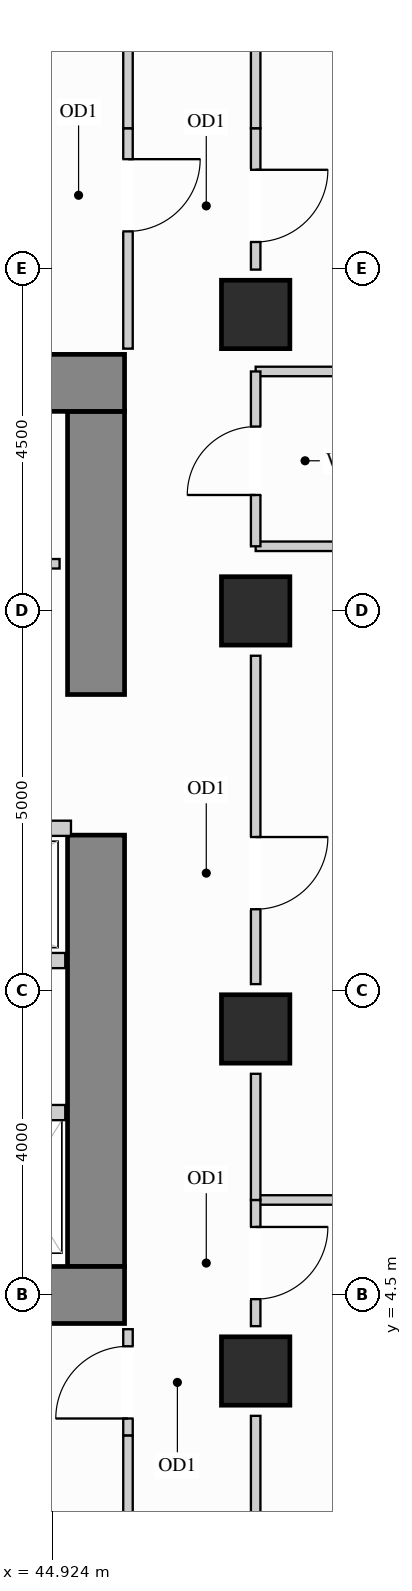
"""IFC4 building model, lengths in metres.
Left out: names, types, materials, properties, quantities, classifications, styles, units other than length and angle.
Written with IfcOpenShell. Run it as: python <this file> out.ifc"""

import sys

from ifc_helpers import new_model, si_unit, direction, frame, frame_2d, origin, origin_2d, place, context, subcontext, project, spatial, rectangle, extrude, source, transform, mapped, element, fill, save


model = new_model("IFC4")
c1 = context("Model", 3, precision=1e-05, world=origin(), true_north=direction((0.0, 1.0)))
c2 = subcontext(c1, "Body", "Model", "MODEL_VIEW")
j1 = project(units=[si_unit("LENGTHUNIT", "METRE"), si_unit("PLANEANGLEUNIT", "RADIAN")], contexts=[c1])
p1 = place(None, origin())
s1 = spatial("IfcSite", under=j1, at=p1, CompositionType="ELEMENT")
p2 = place(p1, origin())
s2 = spatial("IfcBuilding", under=s1, at=p2, CompositionType="ELEMENT")
p3 = place(p2, frame((0.0, 0.0, 109.8)))
s3 = spatial("IfcBuildingStorey", under=s2, at=p3, CompositionType="ELEMENT", Elevation=109.8)
m1 = source(origin(), c2, "Body", "SweptSolid", [
    extrude(rectangle(XDim=0.9, YDim=0.9, at=origin_2d()), origin(), (0.0, 0.0, 1.0), 3.38),
])
for number, where, z_axis, x_axis in (
    (1, (47.6, 13.5, 0.0), (0.0, 0.0, 1.0), (1.0, 0.0, 0.0)),
    (2, (47.6, 3.5, 0.0), (0.0, 0.0, 1.0), (1.0, 0.0, 0.0)),
    (3, (47.6, 8.0, 0.0), (0.0, 0.0, 1.0), (1.0, 0.0, 0.0)),
    (4, (47.6, 17.4, 0.0), (0.0, 0.0, 1.0), (1.0, 0.0, 0.0)),
):
    element("IfcColumn", number, at=place(p3, frame(where, z_axis=z_axis, x_axis=x_axis)), inside=s3, PredefinedType="COLUMN", context=c2, shape_type="MappedRepresentation", body=[
        mapped(m1, transform((0.0, 0.0, 0.0), x_axis=(1.0, 0.0, 0.0), y_axis=(0.0, 1.0, 0.0), z_axis=(0.0, 0.0, 1.0))),
    ])
m2 = source(origin(), c2, "Body", "SweptSolid", [
    extrude(rectangle(XDim=5.675, YDim=0.75, at=frame_2d((2.837, 0.0))), origin(), (0.0, 0.0, 1.0), 3.38),
])
p4 = place(p3, frame((45.5, 4.875, 0.0), z_axis=(0.0, 0.0, 1.0), x_axis=(0.0, 1.0, 0.0)))
e5 = element("IfcWall", 5, at=p4, inside=s3, PredefinedType="SHEAR", context=c2, shape_type="MappedRepresentation", body=[
    mapped(m2, transform((0.0, 0.0, 0.0), x_axis=(1.0, 0.0, 0.0), y_axis=(0.0, 1.0, 0.0), z_axis=(0.0, 0.0, 1.0))),
])
m3 = source(origin(), c2, "Body", "SweptSolid", [
    extrude(rectangle(XDim=3.725, YDim=0.75, at=frame_2d((1.863, 0.0))), origin(), (0.0, 0.0, 1.0), 3.38),
])
p5 = place(p3, frame((45.5, 12.4, 0.0), z_axis=(0.0, 0.0, 1.0), x_axis=(0.0, 1.0, 0.0)))
e6 = element("IfcWall", 6, at=p5, inside=s3, PredefinedType="SHEAR", context=c2, shape_type="MappedRepresentation", body=[
    mapped(m3, transform((0.0, 0.0, 0.0), x_axis=(1.0, 0.0, 0.0), y_axis=(0.0, 1.0, 0.0), z_axis=(0.0, 0.0, 1.0))),
])
m4 = source(origin(), c2, "Body", "SweptSolid", [
    extrude(rectangle(XDim=10.25, YDim=0.75, at=frame_2d((5.125, 0.0))), origin(), (0.0, 0.0, 1.0), 3.38),
])
for number, where, z_axis, x_axis in (
    (7, (35.625, 16.5, 0.0), (0.0, 0.0, 1.0), (1.0, 0.0, 0.0)),
    (8, (35.625, 4.5, 0.0), (0.0, 0.0, 1.0), (1.0, 0.0, 0.0)),
):
    element("IfcWall", number, at=place(p3, frame(where, z_axis=z_axis, x_axis=x_axis)), inside=s3, PredefinedType="SHEAR", context=c2, shape_type="MappedRepresentation", body=[
        mapped(m4, transform((0.0, 0.0, 0.0), x_axis=(1.0, 0.0, 0.0), y_axis=(0.0, 1.0, 0.0), z_axis=(0.0, 0.0, 1.0))),
    ])
p6 = place(p3, frame((41.8, 14.12, 0.0), z_axis=(0.0, 0.0, 1.0), x_axis=(1.0, 0.0, 0.0)))
e9 = element("IfcWall", 9, at=p6, inside=s3, PredefinedType="PARTITIONING", context=c2, shape_type="SweptSolid", body=[
    extrude(rectangle(XDim=3.22, YDim=0.125, at=frame_2d((1.61, 0.0))), origin(), (0.0, 0.0, 1.0), 3.365),
])
p7 = place(p6, frame((1.135, 0.0, 0.0)))
e10 = element("IfcOpeningElement", 10, at=p7, cuts=e9, PredefinedType="OPENING", context=c2, shape_type="SweptSolid", body=[
    extrude(rectangle(XDim=0.85, YDim=2.1, at=frame_2d((0.425, 1.05))), frame((0.0, 0.073, 0.0), z_axis=(0.0, -1.0, 0.0), x_axis=(1.0, 0.0, 0.0)), (0.0, 0.0, 1.0), 0.145),
])
m5 = source(origin(), c2, "Body", "SweptSolid", [
    extrude(rectangle(XDim=8.048, YDim=0.125, at=frame_2d((4.024, 0.0))), origin(), (0.0, 0.0, 1.0), 3.365),
])
p8 = place(p3, frame((47.6, 14.35, 0.0), z_axis=(0.0, 0.0, 1.0), x_axis=(1.0, 0.0, 0.0)))
e11 = element("IfcWall", 11, at=p8, inside=s3, PredefinedType="PARTITIONING", context=c2, shape_type="MappedRepresentation", body=[
    mapped(m5, transform((0.0, 0.0, 0.0), x_axis=(1.0, 0.0, 0.0), y_axis=(0.0, 1.0, 0.0), z_axis=(0.0, 0.0, 1.0))),
])
m6 = source(origin(), c2, "Body", "SweptSolid", [
    extrude(rectangle(XDim=8.048, YDim=0.125, at=frame_2d((4.024, 0.0))), origin(), (0.0, 0.0, 1.0), 2.677),
])
p9 = place(p3, frame((47.6, 16.65, 0.0), z_axis=(0.0, 0.0, 1.0), x_axis=(1.0, 0.0, 0.0)))
e12 = element("IfcWall", 12, at=p9, inside=s3, PredefinedType="PARTITIONING", context=c2, shape_type="MappedRepresentation", body=[
    mapped(m6, transform((0.0, 0.0, 0.0), x_axis=(1.0, 0.0, 0.0), y_axis=(0.0, 1.0, 0.0), z_axis=(0.0, 0.0, 1.0))),
])
p10 = place(p3, frame((47.6, 5.75, 0.0), z_axis=(0.0, 0.0, 1.0), x_axis=(1.0, 0.0, 0.0)))
e13 = element("IfcWall", 13, at=p10, inside=s3, PredefinedType="PARTITIONING", context=c2, shape_type="MappedRepresentation", body=[
    mapped(m5, transform((0.0, 0.0, 0.0), x_axis=(1.0, 0.0, 0.0), y_axis=(0.0, 1.0, 0.0), z_axis=(0.0, 0.0, 1.0))),
])
p11 = place(p3, frame((47.6, 4.09, 0.0), z_axis=(0.0, 0.0, 1.0), x_axis=(0.0, 1.0, 0.0)))
e14 = element("IfcWall", 14, at=p11, inside=s3, PredefinedType="PARTITIONING", context=c2, shape_type="SweptSolid", body=[
    extrude(rectangle(XDim=1.66, YDim=0.125, at=frame_2d((0.83, 0.0))), origin(), (0.0, 0.0, 1.0), 2.677),
])
p12 = place(p11, frame((0.355, 0.0, 0.0)))
e15 = element("IfcOpeningElement", 15, at=p12, cuts=e14, PredefinedType="OPENING", context=c2, shape_type="SweptSolid", body=[
    extrude(rectangle(XDim=0.95, YDim=2.15, at=frame_2d((0.475, 1.075))), frame((0.0, 0.073, 0.0), z_axis=(0.0, -1.0, 0.0), x_axis=(1.0, 0.0, 0.0)), (0.0, 0.0, 1.0), 0.145),
])
m7 = source(origin(), c2, "Body", "SweptSolid", [
    extrude(rectangle(XDim=1.72, YDim=0.125, at=frame_2d((0.86, 0.0))), origin(), (0.0, 0.0, 1.0), 2.677),
])
p13 = place(p3, frame((47.6, 1.19, 0.0), z_axis=(0.0, 0.0, 1.0), x_axis=(0.0, 1.0, 0.0)))
e16 = element("IfcWall", 16, at=p13, inside=s3, PredefinedType="PARTITIONING", context=c2, shape_type="MappedRepresentation", body=[
    mapped(m7, transform((0.0, 0.0, 0.0), x_axis=(1.0, 0.0, 0.0), y_axis=(0.0, 1.0, 0.0), z_axis=(0.0, 0.0, 1.0))),
])
m8 = source(origin(), c2, "Body", "SweptSolid", [
    extrude(rectangle(XDim=1.66, YDim=0.125, at=frame_2d((0.83, 0.0))), origin(), (0.0, 0.0, 1.0), 2.677),
])
p14 = place(p3, frame((47.6, 5.75, 0.0), z_axis=(0.0, 0.0, 1.0), x_axis=(0.0, 1.0, 0.0)))
e17 = element("IfcWall", 17, at=p14, inside=s3, PredefinedType="PARTITIONING", context=c2, shape_type="MappedRepresentation", body=[
    mapped(m8, transform((0.0, 0.0, 0.0), x_axis=(1.0, 0.0, 0.0), y_axis=(0.0, 1.0, 0.0), z_axis=(0.0, 0.0, 1.0))),
])
p15 = place(p3, frame((47.6, 8.59, 0.0), z_axis=(0.0, 0.0, 1.0), x_axis=(0.0, 1.0, 0.0)))
e18 = element("IfcWall", 18, at=p15, inside=s3, PredefinedType="PARTITIONING", context=c2, shape_type="SweptSolid", body=[
    extrude(rectangle(XDim=4.32, YDim=0.125, at=frame_2d((2.16, 0.0))), origin(), (0.0, 0.0, 1.0), 2.677),
])
p16 = place(p15, frame((0.985, 0.0, 0.0)))
e19 = element("IfcOpeningElement", 19, at=p16, cuts=e18, PredefinedType="OPENING", context=c2, shape_type="SweptSolid", body=[
    extrude(rectangle(XDim=0.95, YDim=2.15, at=frame_2d((0.475, 1.075))), frame((0.0, 0.073, 0.0), z_axis=(0.0, -1.0, 0.0), x_axis=(1.0, 0.0, 0.0)), (0.0, 0.0, 1.0), 0.145),
])
p17 = place(p3, frame((47.6, 17.99, 0.0), z_axis=(0.0, 0.0, 1.0), x_axis=(0.0, 1.0, 0.0)))
e20 = element("IfcWall", 20, at=p17, inside=s3, PredefinedType="PARTITIONING", context=c2, shape_type="SweptSolid", body=[
    extrude(rectangle(XDim=1.86, YDim=0.125, at=frame_2d((0.93, 0.0))), origin(), (0.0, 0.0, 1.0), 2.677),
])
p18 = place(p17, frame((0.363, 0.0, 0.0)))
e21 = element("IfcOpeningElement", 21, at=p18, cuts=e20, PredefinedType="OPENING", context=c2, shape_type="SweptSolid", body=[
    extrude(rectangle(XDim=0.95, YDim=2.15, at=frame_2d((0.475, 1.075))), frame((0.0, 0.073, 0.0), z_axis=(0.0, -1.0, 0.0), x_axis=(1.0, 0.0, 0.0)), (0.0, 0.0, 1.0), 0.145),
])
m9 = source(origin(), c2, "Body", "SweptSolid", [
    extrude(rectangle(XDim=1.46, YDim=0.125, at=frame_2d((0.73, 0.0))), origin(), (0.0, 0.0, 1.0), 2.677),
])
p19 = place(p3, frame((47.6, 19.85, 0.0), z_axis=(0.0, 0.0, 1.0), x_axis=(0.0, 1.0, 0.0)))
e22 = element("IfcWall", 22, at=p19, inside=s3, PredefinedType="PARTITIONING", context=c2, shape_type="MappedRepresentation", body=[
    mapped(m9, transform((0.0, 0.0, 0.0), x_axis=(1.0, 0.0, 0.0), y_axis=(0.0, 1.0, 0.0), z_axis=(0.0, 0.0, 1.0))),
])
p20 = place(p3, frame((47.6, 14.35, 0.0), z_axis=(0.0, 0.0, 1.0), x_axis=(0.0, 1.0, 0.0)))
e23 = element("IfcWall", 23, at=p20, inside=s3, PredefinedType="PARTITIONING", context=c2, shape_type="SweptSolid", body=[
    extrude(rectangle(XDim=2.3, YDim=0.125, at=frame_2d((1.15, 0.0))), origin(), (0.0, 0.0, 1.0), 2.677),
])
p21 = place(p20, frame((0.675, 0.0, 0.0)))
e24 = element("IfcOpeningElement", 24, at=p21, cuts=e23, PredefinedType="OPENING", context=c2, shape_type="SweptSolid", body=[
    extrude(rectangle(XDim=0.9, YDim=2.15, at=frame_2d((0.45, 1.075))), frame((0.0, 0.073, 0.0), z_axis=(0.0, -1.0, 0.0), x_axis=(1.0, 0.0, 0.0)), (0.0, 0.0, 1.0), 0.145),
])
p22 = place(p3, frame((45.92, 16.95, 0.0), z_axis=(0.0, 0.0, 1.0), x_axis=(0.0, 1.0, 0.0)))
e25 = element("IfcWall", 25, at=p22, inside=s3, PredefinedType="PARTITIONING", context=c2, shape_type="SweptSolid", body=[
    extrude(rectangle(XDim=2.9, YDim=0.125, at=frame_2d((1.45, 0.0))), origin(), (0.0, 0.0, 1.0), 3.365),
])
p23 = place(p22, frame((1.543, 0.0, 0.0)))
e26 = element("IfcOpeningElement", 26, at=p23, cuts=e25, PredefinedType="OPENING", context=c2, shape_type="SweptSolid", body=[
    extrude(rectangle(XDim=0.95, YDim=2.15, at=frame_2d((0.475, 1.075))), frame((0.0, 0.073, 0.0), z_axis=(0.0, -1.0, 0.0), x_axis=(1.0, 0.0, 0.0)), (0.0, 0.0, 1.0), 0.145),
])
m10 = source(origin(), c2, "Body", "SweptSolid", [
    extrude(rectangle(XDim=2.298, YDim=0.125, at=frame_2d((1.149, 0.0))), origin(), (0.0, 0.0, 1.0), 3.365),
])
p24 = place(p3, frame((45.92, 19.85, 0.0), z_axis=(0.0, 0.0, 1.0), x_axis=(0.0, 1.0, 0.0)))
e27 = element("IfcWall", 27, at=p24, inside=s3, PredefinedType="PARTITIONING", context=c2, shape_type="MappedRepresentation", body=[
    mapped(m10, transform((0.0, 0.0, 0.0), x_axis=(1.0, 0.0, 0.0), y_axis=(0.0, 1.0, 0.0), z_axis=(0.0, 0.0, 1.0))),
])
p25 = place(p3, frame((45.92, 2.65, 0.0), z_axis=(0.0, 0.0, 1.0), x_axis=(0.0, 1.0, 0.0)))
e28 = element("IfcWall", 28, at=p25, inside=s3, PredefinedType="PARTITIONING", context=c2, shape_type="SweptSolid", body=[
    extrude(rectangle(XDim=1.4, YDim=0.125, at=frame_2d((0.7, 0.0))), origin(), (0.0, 0.0, 1.0), 3.365),
])
p26 = place(p25, frame((0.225, 0.0, 0.0)))
e29 = element("IfcOpeningElement", 29, at=p26, cuts=e28, PredefinedType="OPENING", context=c2, shape_type="SweptSolid", body=[
    extrude(rectangle(XDim=0.95, YDim=2.15, at=frame_2d((0.475, 1.075))), frame((0.0, 0.073, 0.0), z_axis=(0.0, -1.0, 0.0), x_axis=(1.0, 0.0, 0.0)), (0.0, 0.0, 1.0), 0.145),
])
p27 = place(p3, frame((45.92, 0.352, 0.0), z_axis=(0.0, 0.0, 1.0), x_axis=(0.0, 1.0, 0.0)))
e30 = element("IfcWall", 30, at=p27, inside=s3, PredefinedType="PARTITIONING", context=c2, shape_type="MappedRepresentation", body=[
    mapped(m10, transform((0.0, 0.0, 0.0), x_axis=(1.0, 0.0, 0.0), y_axis=(0.0, 1.0, 0.0), z_axis=(0.0, 0.0, 1.0))),
])
m11 = source(origin(), c2, "Body", "SweptSolid", [
    extrude(rectangle(XDim=1.245, YDim=0.2, at=frame_2d((0.623, 0.0))), origin(), (0.0, 0.0, 1.0), 3.365),
])
p28 = place(p3, frame((43.85, 6.9, 0.0), z_axis=(0.0, 0.0, 1.0), x_axis=(1.0, 0.0, 0.0)))
e31 = element("IfcWall", 31, at=p28, inside=s3, PredefinedType="PARTITIONING", context=c2, shape_type="MappedRepresentation", body=[
    mapped(m11, transform((0.0, 0.0, 0.0), x_axis=(1.0, 0.0, 0.0), y_axis=(0.0, 1.0, 0.0), z_axis=(0.0, 0.0, 1.0))),
])
m12 = source(origin(), c2, "Body", "SweptSolid", [
    extrude(rectangle(XDim=3.49, YDim=0.2, at=frame_2d((1.745, 0.0))), origin(), (0.0, 0.0, 1.0), 3.365),
])
p29 = place(p3, frame((41.68, 10.64, 0.0), z_axis=(0.0, 0.0, 1.0), x_axis=(1.0, 0.0, 0.0)))
e32 = element("IfcWall", 32, at=p29, inside=s3, PredefinedType="PARTITIONING", context=c2, shape_type="MappedRepresentation", body=[
    mapped(m12, transform((0.0, 0.0, 0.0), x_axis=(1.0, 0.0, 0.0), y_axis=(0.0, 1.0, 0.0), z_axis=(0.0, 0.0, 1.0))),
])
m13 = source(origin(), c2, "Body", "SweptSolid", [
    extrude(rectangle(XDim=3.415, YDim=0.2, at=frame_2d((1.708, 0.0))), origin(), (0.0, 0.0, 1.0), 3.365),
])
p30 = place(p3, frame((41.68, 8.9, 0.0), z_axis=(0.0, 0.0, 1.0), x_axis=(1.0, 0.0, 0.0)))
e33 = element("IfcWall", 33, at=p30, inside=s3, PredefinedType="PARTITIONING", context=c2, shape_type="MappedRepresentation", body=[
    mapped(m13, transform((0.0, 0.0, 0.0), x_axis=(1.0, 0.0, 0.0), y_axis=(0.0, 1.0, 0.0), z_axis=(0.0, 0.0, 1.0))),
])
m14 = source(origin(), c2, "Body", "SweptSolid", [
    extrude(rectangle(XDim=0.95, YDim=2.15, at=frame_2d((0.475, 1.075))), frame((0.0, 0.025, 0.0), z_axis=(0.0, -1.0, 0.0), x_axis=(1.0, 0.0, 0.0)), (0.0, 0.0, 1.0), 0.05),
])
p31 = place(p23, origin())
e34 = element("IfcDoor", 34, at=p31, inside=s3, OperationType="SINGLE_SWING_RIGHT", PredefinedType="DOOR", context=c2, shape_type="MappedRepresentation", body=[
    mapped(m14, transform((0.0, 0.0, 0.0), x_axis=(1.0, 0.0, 0.0), y_axis=(0.0, 1.0, 0.0), z_axis=(0.0, 0.0, 1.0))),
])
fill(e26, e34)
p32 = place(p26, origin())
e35 = element("IfcDoor", 35, at=p32, inside=s3, OperationType="SINGLE_SWING_LEFT", PredefinedType="DOOR", context=c2, shape_type="MappedRepresentation", body=[
    mapped(m14, transform((0.0, 0.0, 0.0), x_axis=(1.0, 0.0, 0.0), y_axis=(0.0, 1.0, 0.0), z_axis=(0.0, 0.0, 1.0))),
])
fill(e29, e35)
p33 = place(p12, origin())
e36 = element("IfcDoor", 36, at=p33, inside=s3, OperationType="SINGLE_SWING_RIGHT", PredefinedType="DOOR", context=c2, shape_type="MappedRepresentation", body=[
    mapped(m14, transform((0.0, 0.0, 0.0), x_axis=(1.0, 0.0, 0.0), y_axis=(0.0, 1.0, 0.0), z_axis=(0.0, 0.0, 1.0))),
])
fill(e15, e36)
p34 = place(p16, origin())
e37 = element("IfcDoor", 37, at=p34, inside=s3, OperationType="SINGLE_SWING_RIGHT", PredefinedType="DOOR", context=c2, shape_type="MappedRepresentation", body=[
    mapped(m14, transform((0.0, 0.0, 0.0), x_axis=(1.0, 0.0, 0.0), y_axis=(0.0, 1.0, 0.0), z_axis=(0.0, 0.0, 1.0))),
])
fill(e19, e37)
p35 = place(p18, origin())
e38 = element("IfcDoor", 38, at=p35, inside=s3, OperationType="SINGLE_SWING_RIGHT", PredefinedType="DOOR", context=c2, shape_type="MappedRepresentation", body=[
    mapped(m14, transform((0.0, 0.0, 0.0), x_axis=(1.0, 0.0, 0.0), y_axis=(0.0, 1.0, 0.0), z_axis=(0.0, 0.0, 1.0))),
])
fill(e21, e38)
m15 = source(origin(), c2, "Body", "SweptSolid", [
    extrude(rectangle(XDim=0.9, YDim=2.15, at=frame_2d((0.45, 1.075))), frame((0.0, 0.025, 0.0), z_axis=(0.0, -1.0, 0.0), x_axis=(1.0, 0.0, 0.0)), (0.0, 0.0, 1.0), 0.05),
])
p36 = place(p21, origin())
e39 = element("IfcDoor", 39, at=p36, inside=s3, OperationType="SINGLE_SWING_LEFT", PredefinedType="DOOR", context=c2, shape_type="MappedRepresentation", body=[
    mapped(m15, transform((0.0, 0.0, 0.0), x_axis=(1.0, 0.0, 0.0), y_axis=(0.0, 1.0, 0.0), z_axis=(0.0, 0.0, 1.0))),
])
fill(e24, e39)
save(model, sys.argv[1])
